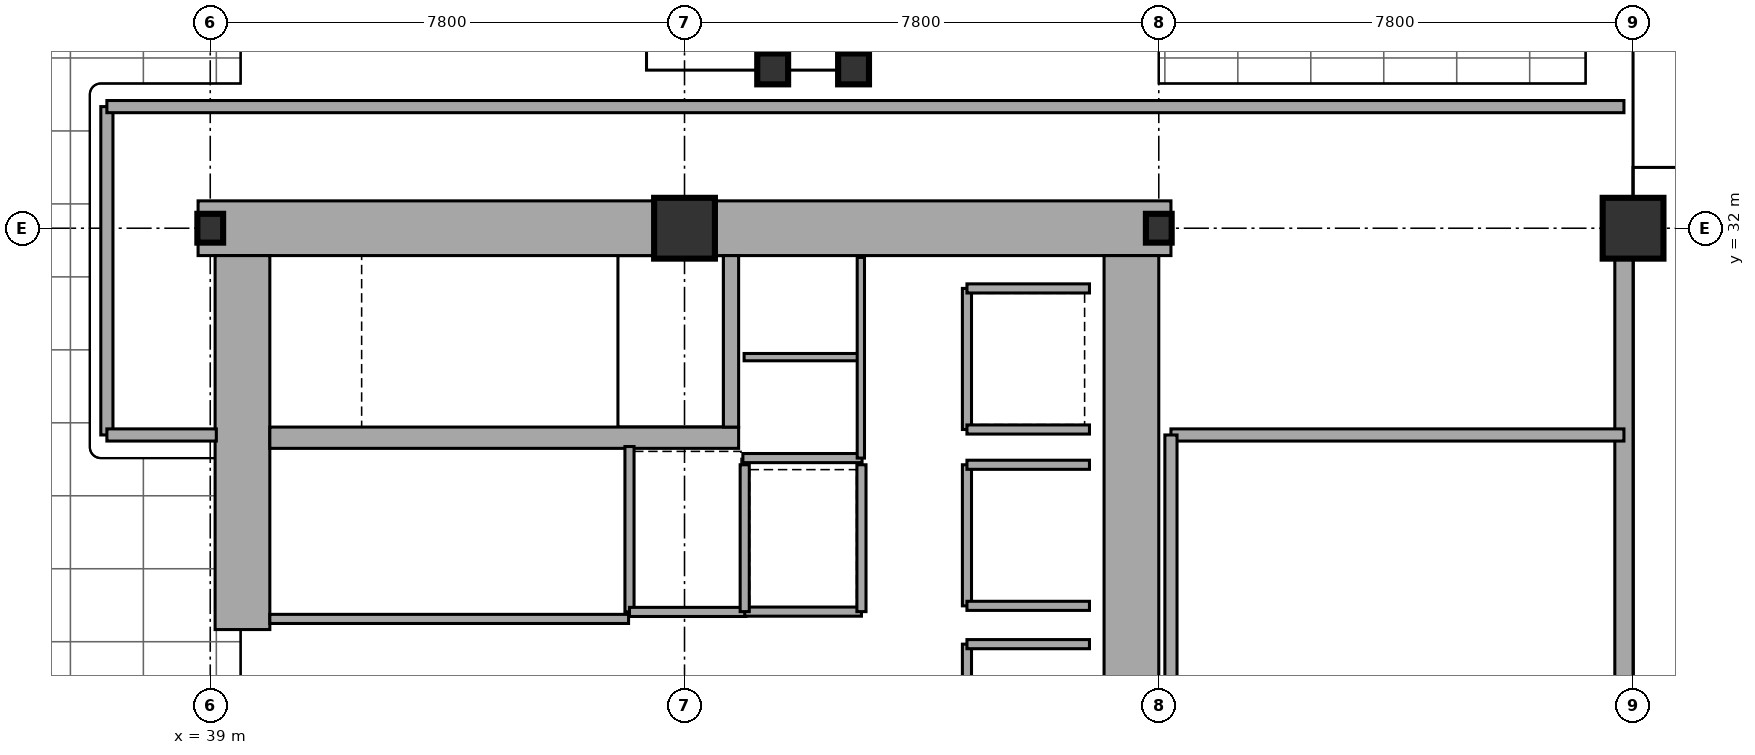
"""IFC4 building model, lengths in metres.
Left out: names, types, materials, properties, quantities, classifications, styles, units other than length and angle.
Written with IfcOpenShell. Run it as: python <this file> out.ifc"""

import sys

from ifc_helpers import new_model, si_unit, direction, frame, frame_2d, origin, origin_2d, place, context, subcontext, project, spatial, rectangle, hollow_circle, i_section, extrude, element, fill, save


model = new_model("IFC4")
c1 = context("Model", 3, precision=1e-05, world=origin(), true_north=direction((0.0, 1.0)))
c2 = subcontext(c1, "Body", "Model", "MODEL_VIEW")
j1 = project(units=[si_unit("LENGTHUNIT", "METRE"), si_unit("PLANEANGLEUNIT", "RADIAN")], contexts=[c1])
p1 = place(None, origin())
s1 = spatial("IfcSite", under=j1, at=p1, CompositionType="ELEMENT")
p2 = place(p1, origin())
s2 = spatial("IfcBuilding", under=s1, at=p2, CompositionType="ELEMENT")
p3 = place(p2, origin())
s3 = spatial("IfcBuildingStorey", under=s2, at=p3, CompositionType="ELEMENT", Elevation=0.0)
p4 = place(p3, frame((38.8, 32.0, 0.0), z_axis=(0.0, 0.0, 1.0), x_axis=(1.0, 0.0, 0.0)))
e1 = element("IfcWall", 1, at=p4, inside=s3, PredefinedType="SHEAR", context=c2, shape_type="SweptSolid", body=[
    extrude(rectangle(XDim=16.0, YDim=0.9, at=frame_2d((8.0, 0.0))), origin(), (0.0, 0.0, 1.0), 5.12),
])
p5 = place(p3, frame((39.53, 25.4, 0.0), z_axis=(0.0, 0.0, 1.0), x_axis=(0.0, 1.0, 0.0)))
e2 = element("IfcWall", 2, at=p5, inside=s3, PredefinedType="SHEAR", context=c2, shape_type="SweptSolid", body=[
    extrude(rectangle(XDim=6.15, YDim=0.9, at=frame_2d((3.075, 0.0))), origin(), (0.0, 0.0, 1.0), 5.12),
])
p6 = place(p5, frame((3.55, 0.0, 0.0)))
e3 = element("IfcOpeningElement", 3, at=p6, cuts=e2, PredefinedType="OPENING", context=c2, shape_type="SweptSolid", body=[
    extrude(rectangle(XDim=1.1, YDim=2.15, at=frame_2d((0.55, 1.075))), frame((0.0, 0.46, 0.0), z_axis=(0.0, -1.0, 0.0), x_axis=(1.0, 0.0, 0.0)), (0.0, 0.0, 1.0), 0.92),
])
p7 = place(p3, frame((54.15, 16.45, 0.0), z_axis=(0.0, 0.0, 1.0), x_axis=(0.0, 1.0, 0.0)))
e4 = element("IfcWall", 4, at=p7, inside=s3, PredefinedType="SHEAR", context=c2, shape_type="SweptSolid", body=[
    extrude(rectangle(XDim=15.1, YDim=0.9, at=frame_2d((7.55, 0.0))), origin(), (0.0, 0.0, 1.0), 5.12),
])
p8 = place(p3, frame((39.98, 28.555, 0.0), z_axis=(0.0, 0.0, 1.0), x_axis=(1.0, 0.0, 0.0)))
e5 = element("IfcWall", 5, at=p8, inside=s3, PredefinedType="SHEAR", context=c2, shape_type="SweptSolid", body=[
    extrude(rectangle(XDim=7.71, YDim=0.35, at=frame_2d((3.855, 0.0))), origin(), (0.0, 0.0, 1.0), 5.12),
])
p9 = place(p8, frame((0.25, 0.0, 0.0)))
e6 = element("IfcOpeningElement", 6, at=p9, cuts=e5, PredefinedType="OPENING", context=c2, shape_type="SweptSolid", body=[
    extrude(rectangle(XDim=1.1, YDim=2.15, at=frame_2d((0.55, 1.075))), frame((0.0, 0.185, 0.0), z_axis=(0.0, -1.0, 0.0), x_axis=(1.0, 0.0, 0.0)), (0.0, 0.0, 1.0), 0.37),
])
p10 = place(p3, frame((47.565, 28.73, 0.0), z_axis=(0.0, 0.0, 1.0), x_axis=(0.0, 1.0, 0.0)))
e7 = element("IfcWall", 7, at=p10, inside=s3, PredefinedType="SHEAR", context=c2, shape_type="SweptSolid", body=[
    extrude(rectangle(XDim=2.82, YDim=0.25, at=frame_2d((1.41, 0.0))), origin(), (0.0, 0.0, 1.0), 5.12),
])
p11 = place(p3, frame((39.0, 32.0, 0.0), z_axis=(0.0, 0.0, 1.0), x_axis=(1.0, 0.0, 0.0)))
e8 = element("IfcColumn", 8, at=p11, inside=s3, PredefinedType="COLUMN", context=c2, shape_type="SweptSolid", body=[
    extrude(i_section(OverallWidth=0.424, OverallDepth=0.474, WebThickness=0.048, FlangeThickness=0.077, at=origin_2d()), origin(), (0.0, 0.0, 1.0), 5.395),
])
p12 = place(p3, frame((46.8, 32.0, 0.0), z_axis=(0.0, 0.0, 1.0), x_axis=(1.0, 0.0, 0.0)))
e9 = element("IfcColumn", 9, at=p12, inside=s3, PredefinedType="COLUMN", context=c2, shape_type="SweptSolid", body=[
    extrude(rectangle(XDim=1.0, YDim=1.0, at=origin_2d()), origin(), (0.0, 0.0, 1.0), 5.395),
])
p13 = place(p3, frame((54.6, 32.0, 0.0), z_axis=(0.0, 0.0, 1.0), x_axis=(1.0, 0.0, 0.0)))
e10 = element("IfcColumn", 10, at=p13, inside=s3, PredefinedType="COLUMN", context=c2, shape_type="SweptSolid", body=[
    extrude(i_section(OverallWidth=0.424, OverallDepth=0.474, WebThickness=0.048, FlangeThickness=0.077, at=origin_2d()), origin(), (0.0, 0.0, 1.0), 5.395),
])
p14 = place(p3, frame((62.4, 32.0, 0.0), z_axis=(0.0, 0.0, 1.0), x_axis=(1.0, 0.0, 0.0)))
e11 = element("IfcColumn", 11, at=p14, inside=s3, PredefinedType="COLUMN", context=c2, shape_type="SweptSolid", body=[
    extrude(rectangle(XDim=1.0, YDim=1.0, at=origin_2d()), origin(), (0.0, 0.0, 1.0), 5.395),
])
for number, where, z_axis, x_axis in (
    (12, (48.25, 34.62, 0.0), (0.0, 0.0, 1.0), (1.0, 0.0, 0.0)),
    (13, (49.58, 34.62, 0.0), (0.0, 0.0, 1.0), (1.0, 0.0, 0.0)),
):
    element("IfcColumn", number, at=place(p3, frame(where, z_axis=z_axis, x_axis=x_axis)), inside=s3, PredefinedType="COLUMN", context=c2, shape_type="SweptSolid", body=[
        extrude(hollow_circle(Radius=0.254, WallThickness=0.02, at=origin_2d()), origin(), (0.0, 0.0, 1.0), 5.394),
    ])
p15 = place(p3, frame((62.25, 24.51, 0.0), z_axis=(0.0, 0.0, 1.0), x_axis=(0.0, 1.0, 0.0)))
e14 = element("IfcWall", 14, at=p15, inside=s3, PredefinedType="STANDARD", context=c2, shape_type="SweptSolid", body=[
    extrude(rectangle(XDim=6.98, YDim=0.3, at=frame_2d((3.49, 0.0))), origin(), (0.0, 0.0, 1.0), 4.648),
])
p16 = place(p15, frame((4.55, 0.0, 0.0)))
e15 = element("IfcOpeningElement", 15, at=p16, cuts=e14, PredefinedType="OPENING", context=c2, shape_type="SweptSolid", body=[
    extrude(rectangle(XDim=1.8, YDim=2.2, at=frame_2d((0.9, 1.1))), frame((0.0, 0.16, 0.0), z_axis=(0.0, -1.0, 0.0), x_axis=(1.0, 0.0, 0.0)), (0.0, 0.0, 1.0), 0.32),
])
p17 = place(p3, frame((39.98, 25.575, 0.0), z_axis=(0.0, 0.0, 1.0), x_axis=(1.0, 0.0, 0.0)))
e16 = element("IfcWall", 16, at=p17, inside=s3, PredefinedType="PARTITIONING", context=c2, shape_type="SweptSolid", body=[
    extrude(rectangle(XDim=5.9, YDim=0.15, at=frame_2d((2.95, 0.0))), origin(), (0.0, 0.0, 1.0), 5.12),
])
p18 = place(p17, frame((2.35, 0.0, 0.0)))
e17 = element("IfcOpeningElement", 17, at=p18, cuts=e16, PredefinedType="OPENING", context=c2, shape_type="SweptSolid", body=[
    extrude(rectangle(XDim=1.05, YDim=2.15, at=frame_2d((0.525, 1.075))), frame((0.0, 0.085, 0.0), z_axis=(0.0, -1.0, 0.0), x_axis=(1.0, 0.0, 0.0)), (0.0, 0.0, 1.0), 0.17),
])
p19 = place(p3, frame((45.895, 25.69, 0.0), z_axis=(0.0, 0.0, 1.0), x_axis=(0.0, 1.0, 0.0)))
e18 = element("IfcWall", 18, at=p19, inside=s3, PredefinedType="PARTITIONING", context=c2, shape_type="SweptSolid", body=[
    extrude(rectangle(XDim=2.72, YDim=0.15, at=frame_2d((1.36, 0.0))), origin(), (0.0, 0.0, 1.0), 5.12),
])
p20 = place(p19, frame((0.81, 0.0, 0.0)))
e19 = element("IfcOpeningElement", 19, at=p20, cuts=e18, PredefinedType="OPENING", context=c2, shape_type="SweptSolid", body=[
    extrude(rectangle(XDim=1.1, YDim=2.15, at=frame_2d((0.55, 1.075))), frame((0.0, 0.085, 0.0), z_axis=(0.0, -1.0, 0.0), x_axis=(1.0, 0.0, 0.0)), (0.0, 0.0, 1.0), 0.17),
])
p21 = place(p3, frame((45.895, 25.69, 0.0), z_axis=(0.0, 0.0, 1.0), x_axis=(1.0, 0.0, 0.0)))
e20 = element("IfcWall", 20, at=p21, inside=s3, PredefinedType="PARTITIONING", context=c2, shape_type="SweptSolid", body=[
    extrude(rectangle(XDim=1.915, YDim=0.15, at=frame_2d((0.958, 0.0))), origin(), (0.0, 0.0, 1.0), 5.12),
])
p22 = place(p3, frame((47.79, 25.695, 0.0), z_axis=(0.0, 0.0, 1.0), x_axis=(1.0, 0.0, 0.0)))
e21 = element("IfcWall", 21, at=p22, inside=s3, PredefinedType="PARTITIONING", context=c2, shape_type="SweptSolid", body=[
    extrude(rectangle(XDim=1.92, YDim=0.15, at=frame_2d((0.96, 0.0))), origin(), (0.0, 0.0, 1.0), 5.12),
])
p23 = place(p22, frame((0.41, 0.0, 0.0)))
e22 = element("IfcOpeningElement", 22, at=p23, cuts=e21, PredefinedType="OPENING", context=c2, shape_type="SweptSolid", body=[
    extrude(rectangle(XDim=1.1, YDim=2.15, at=frame_2d((0.55, 1.075))), frame((0.0, 0.085, 0.0), z_axis=(0.0, -1.0, 0.0), x_axis=(1.0, 0.0, 0.0)), (0.0, 0.0, 1.0), 0.17),
])
for number, where, z_axis, x_axis in (
    (23, (47.79, 25.695, 0.0), (0.0, 0.0, 1.0), (0.0, 1.0, 0.0)),
    (24, (49.71, 25.695, 0.0), (0.0, 0.0, 1.0), (0.0, 1.0, 0.0)),
):
    element("IfcWall", number, at=place(p3, frame(where, z_axis=z_axis, x_axis=x_axis)), inside=s3, PredefinedType="PARTITIONING", context=c2, shape_type="SweptSolid", body=[
        extrude(rectangle(XDim=2.415, YDim=0.15, at=frame_2d((1.208, 0.0))), origin(), (0.0, 0.0, 1.0), 5.12),
    ])
p24 = place(p3, frame((51.445, 28.69, 0.0), z_axis=(0.0, 0.0, 1.0), x_axis=(0.0, 1.0, 0.0)))
e25 = element("IfcWall", 25, at=p24, inside=s3, PredefinedType="PARTITIONING", context=c2, shape_type="SweptSolid", body=[
    extrude(rectangle(XDim=2.32, YDim=0.15, at=frame_2d((1.16, 0.0))), origin(), (0.0, 0.0, 1.0), 5.12),
])
p25 = place(p24, frame((0.61, 0.0, 0.0)))
e26 = element("IfcOpeningElement", 26, at=p25, cuts=e25, PredefinedType="OPENING", context=c2, shape_type="SweptSolid", body=[
    extrude(rectangle(XDim=1.1, YDim=2.15, at=frame_2d((0.55, 1.075))), frame((0.0, 0.085, 0.0), z_axis=(0.0, -1.0, 0.0), x_axis=(1.0, 0.0, 0.0)), (0.0, 0.0, 1.0), 0.17),
])
for number, where, z_axis, x_axis in (
    (27, (51.445, 28.69, 0.0), (0.0, 0.0, 1.0), (1.0, 0.0, 0.0)),
    (28, (51.445, 31.01, 0.0), (0.0, 0.0, 1.0), (1.0, 0.0, 0.0)),
):
    element("IfcWall", number, at=place(p3, frame(where, z_axis=z_axis, x_axis=x_axis)), inside=s3, PredefinedType="PARTITIONING", context=c2, shape_type="SweptSolid", body=[
        extrude(rectangle(XDim=2.015, YDim=0.15, at=frame_2d((1.007, 0.0))), origin(), (0.0, 0.0, 1.0), 5.12),
    ])
p26 = place(p3, frame((51.445, 25.79, 0.0), z_axis=(0.0, 0.0, 1.0), x_axis=(0.0, 1.0, 0.0)))
e29 = element("IfcWall", 29, at=p26, inside=s3, PredefinedType="PARTITIONING", context=c2, shape_type="SweptSolid", body=[
    extrude(rectangle(XDim=2.32, YDim=0.15, at=frame_2d((1.16, 0.0))), origin(), (0.0, 0.0, 1.0), 5.12),
])
p27 = place(p26, frame((0.61, 0.0, 0.0)))
e30 = element("IfcOpeningElement", 30, at=p27, cuts=e29, PredefinedType="OPENING", context=c2, shape_type="SweptSolid", body=[
    extrude(rectangle(XDim=1.1, YDim=2.15, at=frame_2d((0.55, 1.075))), frame((0.0, 0.085, 0.0), z_axis=(0.0, -1.0, 0.0), x_axis=(1.0, 0.0, 0.0)), (0.0, 0.0, 1.0), 0.17),
])
for number, where, z_axis, x_axis in (
    (31, (51.445, 25.79, 0.0), (0.0, 0.0, 1.0), (1.0, 0.0, 0.0)),
    (32, (51.445, 28.11, 0.0), (0.0, 0.0, 1.0), (1.0, 0.0, 0.0)),
):
    element("IfcWall", number, at=place(p3, frame(where, z_axis=z_axis, x_axis=x_axis)), inside=s3, PredefinedType="PARTITIONING", context=c2, shape_type="SweptSolid", body=[
        extrude(rectangle(XDim=2.015, YDim=0.15, at=frame_2d((1.007, 0.0))), origin(), (0.0, 0.0, 1.0), 5.12),
    ])
p28 = place(p3, frame((51.445, 22.84, 0.0), z_axis=(0.0, 0.0, 1.0), x_axis=(0.0, 1.0, 0.0)))
e33 = element("IfcWall", 33, at=p28, inside=s3, PredefinedType="PARTITIONING", context=c2, shape_type="SweptSolid", body=[
    extrude(rectangle(XDim=2.32, YDim=0.15, at=frame_2d((1.16, 0.0))), origin(), (0.0, 0.0, 1.0), 5.12),
])
p29 = place(p28, frame((0.61, 0.0, 0.0)))
e34 = element("IfcOpeningElement", 34, at=p29, cuts=e33, PredefinedType="OPENING", context=c2, shape_type="SweptSolid", body=[
    extrude(rectangle(XDim=1.1, YDim=2.15, at=frame_2d((0.55, 1.075))), frame((0.0, 0.085, 0.0), z_axis=(0.0, -1.0, 0.0), x_axis=(1.0, 0.0, 0.0)), (0.0, 0.0, 1.0), 0.17),
])
p30 = place(p3, frame((51.445, 25.16, 0.0), z_axis=(0.0, 0.0, 1.0), x_axis=(1.0, 0.0, 0.0)))
e35 = element("IfcWall", 35, at=p30, inside=s3, PredefinedType="PARTITIONING", context=c2, shape_type="SweptSolid", body=[
    extrude(rectangle(XDim=2.015, YDim=0.15, at=frame_2d((1.007, 0.0))), origin(), (0.0, 0.0, 1.0), 5.12),
])
p31 = place(p3, frame((47.76, 28.22, 0.0), z_axis=(0.0, 0.0, 1.0), x_axis=(1.0, 0.0, 0.0)))
e36 = element("IfcWall", 36, at=p31, inside=s3, PredefinedType="PARTITIONING", context=c2, shape_type="SweptSolid", body=[
    extrude(rectangle(XDim=1.96, YDim=0.15, at=frame_2d((0.98, 0.0))), origin(), (0.0, 0.0, 1.0), 5.12),
])
p32 = place(p3, frame((47.78, 29.88, 0.0), z_axis=(0.0, 0.0, 1.0), x_axis=(1.0, 0.0, 0.0)))
e37 = element("IfcWall", 37, at=p32, inside=s3, PredefinedType="PARTITIONING", context=c2, shape_type="SweptSolid", body=[
    extrude(rectangle(XDim=1.92, YDim=0.12, at=frame_2d((0.96, 0.0))), origin(), (0.0, 0.0, 1.0), 5.12),
])
p33 = place(p3, frame((49.7, 28.22, 0.0), z_axis=(0.0, 0.0, 1.0), x_axis=(0.0, 1.0, 0.0)))
e38 = element("IfcWall", 38, at=p33, inside=s3, PredefinedType="PARTITIONING", context=c2, shape_type="SweptSolid", body=[
    extrude(rectangle(XDim=3.3, YDim=0.12, at=frame_2d((1.65, 0.0))), origin(), (0.0, 0.0, 1.0), 5.12),
])
p34 = place(p33, frame((0.42, 0.0, 0.0)))
e39 = element("IfcOpeningElement", 39, at=p34, cuts=e38, PredefinedType="OPENING", context=c2, shape_type="SweptSolid", body=[
    extrude(rectangle(XDim=0.85, YDim=2.15, at=frame_2d((0.425, 1.075))), frame((0.0, 0.07, 0.0), z_axis=(0.0, -1.0, 0.0), x_axis=(1.0, 0.0, 0.0)), (0.0, 0.0, 1.0), 0.14),
])
p35 = place(p33, frame((1.98, 0.0, 0.0)))
e40 = element("IfcOpeningElement", 40, at=p35, cuts=e38, PredefinedType="OPENING", context=c2, shape_type="SweptSolid", body=[
    extrude(rectangle(XDim=0.85, YDim=2.15, at=frame_2d((0.425, 1.075))), frame((0.0, 0.07, 0.0), z_axis=(0.0, -1.0, 0.0), x_axis=(1.0, 0.0, 0.0)), (0.0, 0.0, 1.0), 0.14),
])
p36 = place(p3, frame((37.3, 28.6, 0.0), z_axis=(0.0, 0.0, 1.0), x_axis=(0.0, 1.0, 0.0)))
e41 = element("IfcWall", 41, at=p36, inside=s3, PredefinedType="SOLIDWALL", context=c2, shape_type="SweptSolid", body=[
    extrude(rectangle(XDim=5.4, YDim=0.2, at=frame_2d((2.7, 0.0))), origin(), (0.0, 0.0, 1.0), 4.338),
])
p37 = place(p3, frame((37.3, 28.6, 0.0), z_axis=(0.0, 0.0, 1.0), x_axis=(1.0, 0.0, 0.0)))
e42 = element("IfcWall", 42, at=p37, inside=s3, PredefinedType="SOLIDWALL", context=c2, shape_type="SweptSolid", body=[
    extrude(rectangle(XDim=1.8, YDim=0.2, at=frame_2d((0.9, 0.0))), origin(), (0.0, 0.0, 1.0), 4.415),
])
p38 = place(p3, frame((37.3, 34.0, 0.0), z_axis=(0.0, 0.0, 1.0), x_axis=(1.0, 0.0, 0.0)))
e43 = element("IfcWall", 43, at=p38, inside=s3, PredefinedType="SOLIDWALL", context=c2, shape_type="SweptSolid", body=[
    extrude(rectangle(XDim=24.95, YDim=0.2, at=frame_2d((12.475, 0.0))), origin(), (0.0, 0.0, 1.0), 4.415),
])
p39 = place(p3, frame((54.8, 28.6, 0.0), z_axis=(0.0, 0.0, 1.0), x_axis=(1.0, 0.0, 0.0)))
e44 = element("IfcWall", 44, at=p39, inside=s3, PredefinedType="SOLIDWALL", context=c2, shape_type="SweptSolid", body=[
    extrude(rectangle(XDim=7.45, YDim=0.2, at=frame_2d((3.725, 0.0))), origin(), (0.0, 0.0, 1.0), 5.12),
])
p40 = place(p3, frame((54.8, 18.65, 0.0), z_axis=(0.0, 0.0, 1.0), x_axis=(0.0, 1.0, 0.0)))
e45 = element("IfcWall", 45, at=p40, inside=s3, PredefinedType="SOLIDWALL", context=c2, shape_type="SweptSolid", body=[
    extrude(rectangle(XDim=9.95, YDim=0.2, at=frame_2d((4.975, 0.0))), origin(), (0.0, 0.0, 1.0), 4.338),
])
p41 = place(p16, frame((1.8, 0.0, 0.0), z_axis=(0.0, 0.0, 1.0), x_axis=(-1.0, 0.0, 0.0)))
e46 = element("IfcDoor", 46, at=p41, inside=s3, OperationType="SINGLE_SWING_LEFT", PredefinedType="DOOR", context=c2, shape_type="SweptSolid", body=[
    extrude(rectangle(XDim=1.8, YDim=2.2, at=frame_2d((0.9, 1.1))), frame((0.0, 0.025, 0.0), z_axis=(0.0, -1.0, 0.0), x_axis=(1.0, 0.0, 0.0)), (0.0, 0.0, 1.0), 0.05),
])
fill(e15, e46)
p42 = place(p18, origin())
e47 = element("IfcDoor", 47, at=p42, inside=s3, OperationType="SINGLE_SWING_LEFT", PredefinedType="DOOR", context=c2, shape_type="SweptSolid", body=[
    extrude(rectangle(XDim=1.05, YDim=2.15, at=frame_2d((0.525, 1.075))), frame((0.0, 0.025, 0.0), z_axis=(0.0, -1.0, 0.0), x_axis=(1.0, 0.0, 0.0)), (0.0, 0.0, 1.0), 0.05),
])
fill(e17, e47)
p43 = place(p20, frame((1.1, 0.0, 0.0), z_axis=(0.0, 0.0, 1.0), x_axis=(-1.0, 0.0, 0.0)))
e48 = element("IfcDoor", 48, at=p43, inside=s3, OperationType="DOUBLE_DOOR_SLIDING", PredefinedType="DOOR", context=c2, shape_type="SweptSolid", body=[
    extrude(rectangle(XDim=1.1, YDim=2.15, at=frame_2d((0.55, 1.075))), frame((0.0, 0.025, 0.0), z_axis=(0.0, -1.0, 0.0), x_axis=(1.0, 0.0, 0.0)), (0.0, 0.0, 1.0), 0.05),
])
fill(e19, e48)
p44 = place(p23, frame((1.1, 0.0, 0.0), z_axis=(0.0, 0.0, 1.0), x_axis=(-1.0, 0.0, 0.0)))
e49 = element("IfcDoor", 49, at=p44, inside=s3, OperationType="DOUBLE_DOOR_SLIDING", PredefinedType="DOOR", context=c2, shape_type="SweptSolid", body=[
    extrude(rectangle(XDim=1.1, YDim=2.15, at=frame_2d((0.55, 1.075))), frame((0.0, 0.025, 0.0), z_axis=(0.0, -1.0, 0.0), x_axis=(1.0, 0.0, 0.0)), (0.0, 0.0, 1.0), 0.05),
])
fill(e22, e49)
p45 = place(p25, frame((1.1, 0.0, 0.0), z_axis=(0.0, 0.0, 1.0), x_axis=(-1.0, 0.0, 0.0)))
e50 = element("IfcDoor", 50, at=p45, inside=s3, OperationType="DOUBLE_DOOR_SLIDING", PredefinedType="DOOR", context=c2, shape_type="SweptSolid", body=[
    extrude(rectangle(XDim=1.1, YDim=2.15, at=frame_2d((0.55, 1.075))), frame((0.0, 0.025, 0.0), z_axis=(0.0, -1.0, 0.0), x_axis=(1.0, 0.0, 0.0)), (0.0, 0.0, 1.0), 0.05),
])
fill(e26, e50)
p46 = place(p27, frame((1.1, 0.0, 0.0), z_axis=(0.0, 0.0, 1.0), x_axis=(-1.0, 0.0, 0.0)))
e51 = element("IfcDoor", 51, at=p46, inside=s3, OperationType="DOUBLE_DOOR_SLIDING", PredefinedType="DOOR", context=c2, shape_type="SweptSolid", body=[
    extrude(rectangle(XDim=1.1, YDim=2.15, at=frame_2d((0.55, 1.075))), frame((0.0, 0.025, 0.0), z_axis=(0.0, -1.0, 0.0), x_axis=(1.0, 0.0, 0.0)), (0.0, 0.0, 1.0), 0.05),
])
fill(e30, e51)
p47 = place(p34, frame((0.85, 0.0, 0.0), z_axis=(0.0, 0.0, 1.0), x_axis=(-1.0, 0.0, 0.0)))
e52 = element("IfcDoor", 52, at=p47, inside=s3, OperationType="SINGLE_SWING_LEFT", PredefinedType="DOOR", context=c2, shape_type="SweptSolid", body=[
    extrude(rectangle(XDim=0.85, YDim=2.15, at=frame_2d((0.425, 1.075))), frame((0.0, 0.025, 0.0), z_axis=(0.0, -1.0, 0.0), x_axis=(1.0, 0.0, 0.0)), (0.0, 0.0, 1.0), 0.05),
])
fill(e39, e52)
p48 = place(p35, frame((0.85, 0.0, 0.0), z_axis=(0.0, 0.0, 1.0), x_axis=(-1.0, 0.0, 0.0)))
e53 = element("IfcDoor", 53, at=p48, inside=s3, OperationType="SINGLE_SWING_RIGHT", PredefinedType="DOOR", context=c2, shape_type="SweptSolid", body=[
    extrude(rectangle(XDim=0.85, YDim=2.15, at=frame_2d((0.425, 1.075))), frame((0.0, 0.025, 0.0), z_axis=(0.0, -1.0, 0.0), x_axis=(1.0, 0.0, 0.0)), (0.0, 0.0, 1.0), 0.05),
])
fill(e40, e53)
p49 = place(p9, origin())
e54 = element("IfcDoor", 54, at=p49, inside=s3, OperationType="SINGLE_SWING_LEFT", PredefinedType="DOOR", context=c2, shape_type="SweptSolid", body=[
    extrude(rectangle(XDim=1.1, YDim=2.15, at=frame_2d((0.55, 1.075))), frame((0.0, 0.025, 0.0), z_axis=(0.0, -1.0, 0.0), x_axis=(1.0, 0.0, 0.0)), (0.0, 0.0, 1.0), 0.05),
])
fill(e6, e54)
p50 = place(p6, frame((1.1, 0.0, 0.0), z_axis=(0.0, 0.0, 1.0), x_axis=(-1.0, 0.0, 0.0)))
e55 = element("IfcDoor", 55, at=p50, inside=s3, OperationType="SINGLE_SWING_LEFT", PredefinedType="DOOR", context=c2, shape_type="SweptSolid", body=[
    extrude(rectangle(XDim=1.1, YDim=2.15, at=frame_2d((0.55, 1.075))), frame((0.0, 0.025, 0.0), z_axis=(0.0, -1.0, 0.0), x_axis=(1.0, 0.0, 0.0)), (0.0, 0.0, 1.0), 0.05),
])
fill(e3, e55)
save(model, sys.argv[1])
